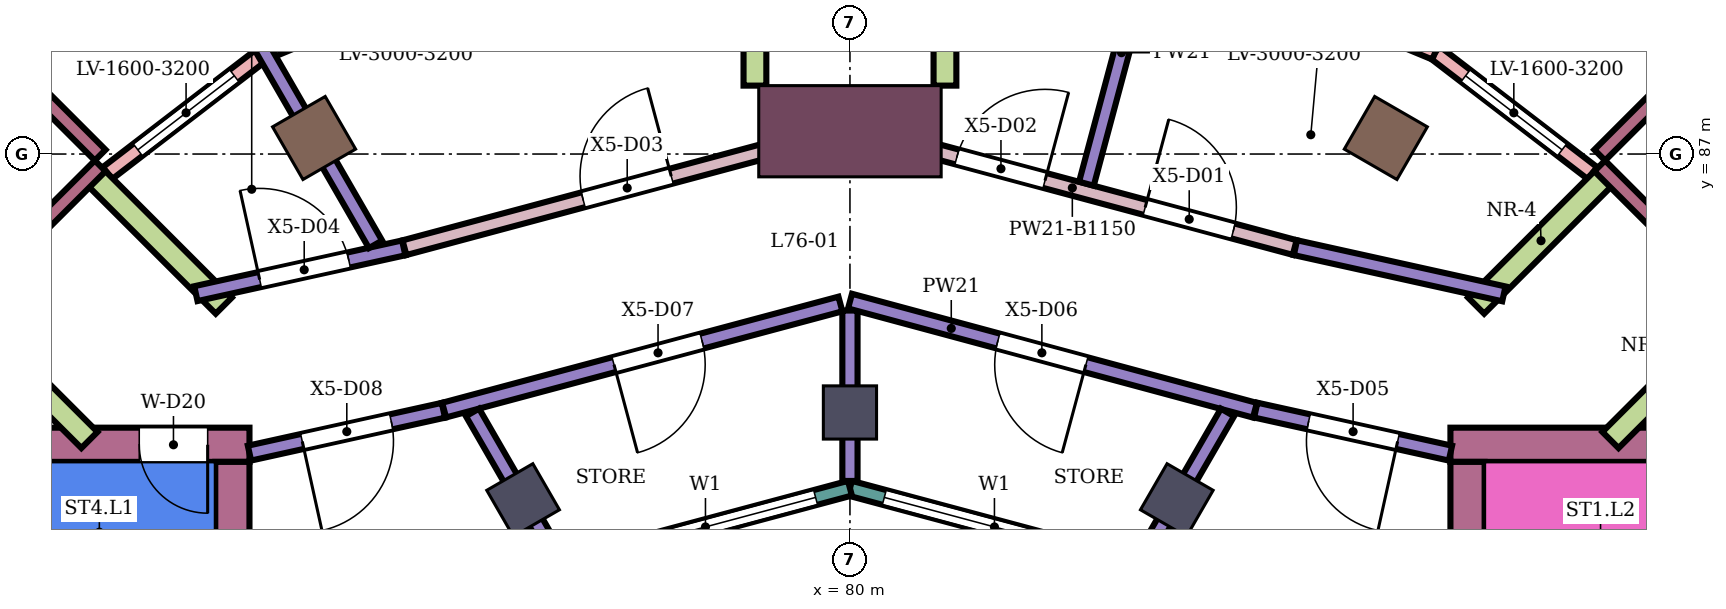
"""IFC4 building model, lengths in metres.
Left out: names, types, materials, properties, quantities, classifications, styles, units other than length and angle.
Written with IfcOpenShell. Run it as: python <this file> out.ifc"""

import sys

from ifc_helpers import new_model, si_unit, direction, frame, frame_2d, origin, origin_2d, place, context, subcontext, project, spatial, rectangle, extrude, element, fill, save


model = new_model("IFC4")
c1 = context("Model", 3, precision=1e-05, world=origin(), true_north=direction((0.0, 1.0)))
c2 = subcontext(c1, "Body", "Model", "MODEL_VIEW")
j1 = project(units=[si_unit("LENGTHUNIT", "METRE"), si_unit("PLANEANGLEUNIT", "RADIAN")], contexts=[c1])
p1 = place(None, origin())
s1 = spatial("IfcSite", under=j1, at=p1, CompositionType="ELEMENT")
p2 = place(p1, origin())
s2 = spatial("IfcBuilding", under=s1, at=p2, CompositionType="ELEMENT")
p3 = place(p2, frame((0.0, 0.0, 333.1)))
s3 = spatial("IfcBuildingStorey", under=s2, at=p3, CompositionType="ELEMENT", Elevation=333.1)
for number, where, z_axis, x_axis in (
    (1, (87.05, 87.211, 0.0), (0.0, 0.0, 1.0), (0.5, 0.866, 0.0)),
    (2, (72.95, 87.211, 0.0), (0.0, 0.0, 1.0), (-0.5, 0.866, 0.0)),
):
    element("IfcColumn", number, at=place(p3, frame(where, z_axis=z_axis, x_axis=x_axis)), inside=s3, PredefinedType="COLUMN", context=c2, shape_type="SweptSolid", body=[
        extrude(rectangle(XDim=0.8, YDim=0.8, at=origin_2d()), origin(), (0.0, 0.0, 1.0), 4.5),
    ])
for number, where, z_axis, x_axis in (
    (3, (84.3, 82.448, 0.0), (0.0, 0.0, 1.0), (0.5, 0.866, 0.0)),
    (4, (80.0, 83.6, 0.0), (0.0, 0.0, 1.0), (0.0, 1.0, 0.0)),
    (5, (75.7, 82.448, 0.0), (0.0, 0.0, 1.0), (-0.5, 0.866, 0.0)),
):
    element("IfcColumn", number, at=place(p3, frame(where, z_axis=z_axis, x_axis=x_axis)), inside=s3, PredefinedType="COLUMN", context=c2, shape_type="SweptSolid", body=[
        extrude(rectangle(XDim=0.7, YDim=0.7, at=origin_2d()), origin(), (0.0, 0.0, 1.0), 4.5),
    ])
p4 = place(p3, frame((80.0, 87.3, 0.0), z_axis=(0.0, 0.0, 1.0), x_axis=(0.0, 1.0, 0.0)))
e6 = element("IfcColumn", 6, at=p4, inside=s3, PredefinedType="COLUMN", context=c2, shape_type="SweptSolid", body=[
    extrude(rectangle(XDim=1.2, YDim=2.4, at=origin_2d()), origin(), (0.0, 0.0, 1.0), 4.5),
])
p5 = place(p3, frame((87.9, 83.175, 0.0), z_axis=(0.0, 0.0, 1.0), x_axis=(1.0, 0.0, 0.0)))
e7 = element("IfcWall", 7, at=p5, inside=s3, PredefinedType="SHEAR", context=c2, shape_type="SweptSolid", body=[
    extrude(rectangle(XDim=3.8, YDim=0.45, at=frame_2d((1.9, 0.0))), origin(), (0.0, 0.0, 1.0), 4.15),
])
p6 = place(p3, frame((88.125, 75.0, 0.0), z_axis=(0.0, 0.0, 1.0), x_axis=(0.0, 1.0, 0.0)))
e8 = element("IfcWall", 8, at=p6, inside=s3, PredefinedType="SHEAR", context=c2, shape_type="SweptSolid", body=[
    extrude(rectangle(XDim=7.95, YDim=0.45, at=frame_2d((3.975, 0.0))), origin(), (0.0, 0.0, 1.0), 4.15),
])
p7 = place(p3, frame((72.1, 83.175, 0.0), z_axis=(0.0, 0.0, 1.0), x_axis=(-1.0, 0.0, 0.0)))
e9 = element("IfcWall", 9, at=p7, inside=s3, PredefinedType="SHEAR", context=c2, shape_type="SweptSolid", body=[
    extrude(rectangle(XDim=6.3, YDim=0.45, at=frame_2d((3.15, 0.0))), origin(), (0.0, 0.0, 1.0), 4.15),
])
p8 = place(p7, frame((0.55, 0.0, 0.0)))
e10 = element("IfcOpeningElement", 10, at=p8, cuts=e9, PredefinedType="OPENING", context=c2, shape_type="SweptSolid", body=[
    extrude(rectangle(XDim=0.9, YDim=2.1, at=frame_2d((0.45, 1.05))), frame((0.0, 0.235, 0.0), z_axis=(0.0, -1.0, 0.0), x_axis=(1.0, 0.0, 0.0)), (0.0, 0.0, 1.0), 0.47),
])
p9 = place(p3, frame((71.875, 82.95, 0.0), z_axis=(0.0, 0.0, 1.0), x_axis=(0.0, -1.0, 0.0)))
e11 = element("IfcWall", 11, at=p9, inside=s3, PredefinedType="SHEAR", context=c2, shape_type="SweptSolid", body=[
    extrude(rectangle(XDim=7.95, YDim=0.45, at=frame_2d((3.975, 0.0))), origin(), (0.0, 0.0, 1.0), 4.15),
])
p10 = place(p3, frame((89.769, 86.749, 0.0), z_axis=(0.0, 0.0, 1.0), x_axis=(-0.793402901715, 0.608696833859, 0.0)))
e12 = element("IfcWall", 12, at=p10, inside=s3, PredefinedType="NOTDEFINED", context=c2, shape_type="SweptSolid", body=[
    extrude(rectangle(XDim=2.608, YDim=0.2, at=frame_2d((1.304, 0.0))), origin(), (0.0, 0.0, 1.0), 4.5),
])
p11 = place(p10, frame((0.504, 0.0, 0.5)))
e13 = element("IfcOpeningElement", 13, at=p11, cuts=e12, PredefinedType="OPENING", context=c2, shape_type="SweptSolid", body=[
    extrude(rectangle(XDim=1.6, YDim=3.2, at=frame_2d((0.8, 1.6))), frame((0.0, 0.11, 0.0), z_axis=(0.0, -1.0, 0.0), x_axis=(1.0, 0.0, 0.0)), (0.0, 0.0, 1.0), 0.22),
])
p12 = place(p3, frame((87.699, 88.336, 0.0), z_axis=(0.0, 0.0, 1.0), x_axis=(-0.923858417842, 0.38273440371, 0.0)))
e14 = element("IfcWall", 14, at=p12, inside=s3, PredefinedType="NOTDEFINED", context=c2, shape_type="SweptSolid", body=[
    extrude(rectangle(XDim=4.02, YDim=0.2, at=frame_2d((2.01, 0.0))), origin(), (0.0, 0.0, 1.0), 4.5),
])
p13 = place(p12, frame((0.51, 0.0, 0.5)))
e15 = element("IfcOpeningElement", 15, at=p13, cuts=e14, PredefinedType="OPENING", context=c2, shape_type="SweptSolid", body=[
    extrude(rectangle(XDim=3.0, YDim=3.2, at=frame_2d((1.5, 1.6))), frame((0.0, 0.11, 0.0), z_axis=(0.0, -1.0, 0.0), x_axis=(1.0, 0.0, 0.0)), (0.0, 0.0, 1.0), 0.22),
])
p14 = place(p3, frame((76.014, 89.875, 0.0), z_axis=(0.0, 0.0, 1.0), x_axis=(-0.923858417842, -0.38273440371, 0.0)))
e16 = element("IfcWall", 16, at=p14, inside=s3, PredefinedType="NOTDEFINED", context=c2, shape_type="SweptSolid", body=[
    extrude(rectangle(XDim=4.02, YDim=0.2, at=frame_2d((2.01, 0.0))), origin(), (0.0, 0.0, 1.0), 4.5),
])
p15 = place(p14, frame((0.51, 0.0, 0.5)))
e17 = element("IfcOpeningElement", 17, at=p15, cuts=e16, PredefinedType="OPENING", context=c2, shape_type="SweptSolid", body=[
    extrude(rectangle(XDim=3.0, YDim=3.2, at=frame_2d((1.5, 1.6))), frame((0.0, 0.11, 0.0), z_axis=(0.0, -1.0, 0.0), x_axis=(1.0, 0.0, 0.0)), (0.0, 0.0, 1.0), 0.22),
])
p16 = place(p3, frame((72.301, 88.336, 0.0), z_axis=(0.0, 0.0, 1.0), x_axis=(-0.793402901715, -0.608696833859, 0.0)))
e18 = element("IfcWall", 18, at=p16, inside=s3, PredefinedType="NOTDEFINED", context=c2, shape_type="SweptSolid", body=[
    extrude(rectangle(XDim=2.608, YDim=0.2, at=frame_2d((1.304, 0.0))), origin(), (0.0, 0.0, 1.0), 4.5),
])
p17 = place(p16, frame((0.504, 0.0, 0.5)))
e19 = element("IfcOpeningElement", 19, at=p17, cuts=e18, PredefinedType="OPENING", context=c2, shape_type="SweptSolid", body=[
    extrude(rectangle(XDim=1.6, YDim=3.2, at=frame_2d((0.8, 1.6))), frame((0.0, 0.11, 0.0), z_axis=(0.0, -1.0, 0.0), x_axis=(1.0, 0.0, 0.0)), (0.0, 0.0, 1.0), 0.22),
])
for number, where, z_axis, x_axis in (
    (20, (90.006, 83.238, 0.0), (0.0, 0.0, 1.0), (0.707, 0.707, 0.0)),
    (21, (88.238, 85.006, 0.0), (0.0, 0.0, 1.0), (0.707, 0.707, 0.0)),
    (22, (81.25, 87.9, 0.0), (0.0, 0.0, 1.0), (0.0, 1.0, 0.0)),
    (23, (78.75, 87.9, 0.0), (0.0, 0.0, 1.0), (0.0, 1.0, 0.0)),
    (24, (71.762, 85.006, 0.0), (0.0, 0.0, 1.0), (-0.707, 0.707, 0.0)),
    (25, (69.994, 83.238, 0.0), (0.0, 0.0, 1.0), (-0.707, 0.707, 0.0)),
):
    element("IfcWall", number, at=place(p3, frame(where, z_axis=z_axis, x_axis=x_axis)), inside=s3, PredefinedType="NOTDEFINED", context=c2, shape_type="SweptSolid", body=[
        extrude(rectangle(XDim=2.416, YDim=0.3, at=frame_2d((1.208, 0.0))), origin(), (0.0, 0.0, 1.0), 4.5),
    ])
p18 = place(p3, frame((83.802, 81.585, 0.0), z_axis=(0.0, 0.0, 1.0), x_axis=(-0.965933654434, 0.258789828301, 0.0)))
e26 = element("IfcWall", 26, at=p18, inside=s3, PredefinedType="NOTDEFINED", context=c2, shape_type="SweptSolid", body=[
    extrude(rectangle(XDim=3.936, YDim=0.2, at=frame_2d((1.968, 0.0))), origin(), (0.0, 0.0, 1.0), 4.5),
])
p19 = place(p18, frame((0.468, 0.0, 0.9)))
e27 = element("IfcOpeningElement", 27, at=p19, cuts=e26, PredefinedType="OPENING", context=c2, shape_type="SweptSolid", body=[
    extrude(rectangle(XDim=3.0, YDim=2.3, at=frame_2d((1.5, 1.15))), frame((0.0, 0.11, 0.0), z_axis=(0.0, -1.0, 0.0), x_axis=(1.0, 0.0, 0.0)), (0.0, 0.0, 1.0), 0.22),
])
p20 = place(p3, frame((80.0, 82.604, 0.0), z_axis=(0.0, 0.0, 1.0), x_axis=(-0.965933654434, -0.258789828301, 0.0)))
e28 = element("IfcWall", 28, at=p20, inside=s3, PredefinedType="NOTDEFINED", context=c2, shape_type="SweptSolid", body=[
    extrude(rectangle(XDim=3.936, YDim=0.2, at=frame_2d((1.968, 0.0))), origin(), (0.0, 0.0, 1.0), 4.5),
])
p21 = place(p20, frame((0.468, 0.0, 0.9)))
e29 = element("IfcOpeningElement", 29, at=p21, cuts=e28, PredefinedType="OPENING", context=c2, shape_type="SweptSolid", body=[
    extrude(rectangle(XDim=3.0, YDim=2.3, at=frame_2d((1.5, 1.15))), frame((0.0, 0.11, 0.0), z_axis=(0.0, -1.0, 0.0), x_axis=(1.0, 0.0, 0.0)), (0.0, 0.0, 1.0), 0.22),
])
p22 = place(p3, frame((68.156, 84.864, 0.0), z_axis=(0.0, 0.0, 1.0), x_axis=(0.707106781187, 0.707106781187, 0.0)))
e30 = element("IfcWall", 30, at=p22, inside=s3, PredefinedType="PARAPET", context=c2, shape_type="SweptSolid", body=[
    extrude(rectangle(XDim=2.8, YDim=0.2, at=frame_2d((1.4, 0.0))), origin(), (0.0, 0.0, 1.0), 1.1),
])
for number, where, z_axis, x_axis in (
    (31, (70.136, 86.985, 0.0), (0.0, 0.0, 1.0), (-0.707, 0.707, 0.0)),
    (32, (91.233, 88.354, 0.0), (0.0, 0.0, 1.0), (-0.707, -0.707, 0.0)),
):
    element("IfcWall", number, at=place(p3, frame(where, z_axis=z_axis, x_axis=x_axis)), inside=s3, PredefinedType="PARAPET", context=c2, shape_type="SweptSolid", body=[
        extrude(rectangle(XDim=1.936, YDim=0.2, at=frame_2d((0.968, 0.0))), origin(), (0.0, 0.0, 1.0), 1.1),
    ])
p23 = place(p3, frame((89.864, 86.844, 0.0), z_axis=(0.0, 0.0, 1.0), x_axis=(0.707106781187, -0.707106781187, 0.0)))
e33 = element("IfcWall", 33, at=p23, inside=s3, PredefinedType="PARAPET", context=c2, shape_type="SweptSolid", body=[
    extrude(rectangle(XDim=2.8, YDim=0.2, at=frame_2d((1.4, 0.0))), origin(), (0.0, 0.0, 1.0), 1.1),
])
p24 = place(p3, frame((71.395, 85.163, 0.0), z_axis=(0.0, 0.0, 1.0), x_axis=(0.976593576861, 0.215092969745, 0.0)))
e34 = element("IfcWall", 34, at=p24, inside=s3, PredefinedType="PARTITIONING", context=c2, shape_type="SweptSolid", body=[
    extrude(rectangle(XDim=2.8, YDim=0.2, at=frame_2d((1.4, 0.0))), origin(), (0.0, 0.0, 1.0), 4.05),
])
p25 = place(p24, frame((0.859, 0.0, 0.0)))
e35 = element("IfcOpeningElement", 35, at=p25, cuts=e34, PredefinedType="OPENING", context=c2, shape_type="SweptSolid", body=[
    extrude(rectangle(XDim=1.2, YDim=2.4, at=frame_2d((0.6, 1.2))), frame((0.0, 0.11, 0.0), z_axis=(0.0, -1.0, 0.0), x_axis=(1.0, 0.0, 0.0)), (0.0, 0.0, 1.0), 0.22),
])
p26 = place(p3, frame((72.1, 83.065, 0.0), z_axis=(0.0, 0.0, 1.0), x_axis=(0.976423939717, 0.215861738037, 0.0)))
e36 = element("IfcWall", 36, at=p26, inside=s3, PredefinedType="PARTITIONING", context=c2, shape_type="SweptSolid", body=[
    extrude(rectangle(XDim=2.613, YDim=0.2, at=frame_2d((1.306, 0.0))), origin(), (0.0, 0.0, 1.0), 4.05),
])
p27 = place(p26, frame((0.711, 0.0, 0.0)))
e37 = element("IfcOpeningElement", 37, at=p27, cuts=e36, PredefinedType="OPENING", context=c2, shape_type="SweptSolid", body=[
    extrude(rectangle(XDim=1.2, YDim=2.4, at=frame_2d((0.6, 1.2))), frame((0.0, 0.11, 0.0), z_axis=(0.0, -1.0, 0.0), x_axis=(1.0, 0.0, 0.0)), (0.0, 0.0, 1.0), 0.22),
])
p28 = place(p3, frame((72.208, 88.5, 0.0), z_axis=(0.0, 0.0, 1.0), x_axis=(0.499692942151, -0.866202611151, 0.0)))
e38 = element("IfcWall", 38, at=p28, inside=s3, PredefinedType="PARTITIONING", context=c2, shape_type="SweptSolid", body=[
    extrude(rectangle(XDim=3.104, YDim=0.2, at=frame_2d((1.552, 0.0))), origin(), (0.0, 0.0, 1.0), 4.05),
])
p29 = place(p3, frame((74.139, 85.768, 0.0), z_axis=(0.0, 0.0, 1.0), x_axis=(0.965901504328, 0.258909798842, 0.0)))
e39 = element("IfcWall", 39, at=p29, inside=s3, PredefinedType="PARTITIONING", context=c2, shape_type="SweptSolid", body=[
    extrude(rectangle(XDim=6.018, YDim=0.2, at=frame_2d((3.009, 0.0))), origin(), (0.0, 0.0, 1.0), 3.35),
])
p30 = place(p29, frame((2.434, 0.0, 0.0)))
e40 = element("IfcOpeningElement", 40, at=p30, cuts=e39, PredefinedType="OPENING", context=c2, shape_type="SweptSolid", body=[
    extrude(rectangle(XDim=1.2, YDim=2.4, at=frame_2d((0.6, 1.2))), frame((0.0, 0.11, 0.0), z_axis=(0.0, -1.0, 0.0), x_axis=(1.0, 0.0, 0.0)), (0.0, 0.0, 1.0), 0.22),
])
p31 = place(p3, frame((74.661, 83.631, 0.0), z_axis=(0.0, 0.0, 1.0), x_axis=(0.965971667126, 0.258647904127, 0.0)))
e41 = element("IfcWall", 41, at=p31, inside=s3, PredefinedType="PARTITIONING", context=c2, shape_type="SweptSolid", body=[
    extrude(rectangle(XDim=5.397, YDim=0.2, at=frame_2d((2.699, 0.0))), origin(), (0.0, 0.0, 1.0), 4.05),
])
p32 = place(p31, frame((2.313, 0.0, 0.0)))
e42 = element("IfcOpeningElement", 42, at=p32, cuts=e41, PredefinedType="OPENING", context=c2, shape_type="SweptSolid", body=[
    extrude(rectangle(XDim=1.2, YDim=2.4, at=frame_2d((0.6, 1.2))), frame((0.0, 0.11, 0.0), z_axis=(0.0, -1.0, 0.0), x_axis=(1.0, 0.0, 0.0)), (0.0, 0.0, 1.0), 0.22),
])
p33 = place(p3, frame((75.034, 83.601, 0.0), z_axis=(0.0, 0.0, 1.0), x_axis=(0.499643577634, -0.866231086563, 0.0)))
e43 = element("IfcWall", 43, at=p33, inside=s3, PredefinedType="PARTITIONING", context=c2, shape_type="SweptSolid", body=[
    extrude(rectangle(XDim=2.233, YDim=0.2, at=frame_2d((1.117, 0.0))), origin(), (0.0, 0.0, 1.0), 4.05),
])
p34 = place(p3, frame((80.0, 82.699, 0.0), z_axis=(0.0, 0.0, 1.0), x_axis=(0.0, 1.0, 0.0)))
e44 = element("IfcWall", 44, at=p34, inside=s3, PredefinedType="PARTITIONING", context=c2, shape_type="SweptSolid", body=[
    extrude(rectangle(XDim=2.242, YDim=0.2, at=frame_2d((1.121, 0.0))), origin(), (0.0, 0.0, 1.0), 4.05),
])
p35 = place(p3, frame((80.0, 87.339, 0.0), z_axis=(0.0, 0.0, 1.0), x_axis=(0.96586472806, -0.259046959234, 0.0)))
e45 = element("IfcWall", 45, at=p35, inside=s3, PredefinedType="PARTITIONING", context=c2, shape_type="SweptSolid", body=[
    extrude(rectangle(XDim=6.058, YDim=0.2, at=frame_2d((3.029, 0.0))), origin(), (0.0, 0.0, 1.0), 3.35),
])
p36 = place(p35, frame((4.021, 0.0, 0.0)))
e46 = element("IfcOpeningElement", 46, at=p36, cuts=e45, PredefinedType="OPENING", context=c2, shape_type="SweptSolid", body=[
    extrude(rectangle(XDim=1.2, YDim=2.4, at=frame_2d((0.6, 1.2))), frame((0.0, 0.11, 0.0), z_axis=(0.0, -1.0, 0.0), x_axis=(1.0, 0.0, 0.0)), (0.0, 0.0, 1.0), 0.22),
])
p37 = place(p35, frame((1.457, 0.0, 0.0)))
e47 = element("IfcOpeningElement", 47, at=p37, cuts=e45, PredefinedType="OPENING", context=c2, shape_type="SweptSolid", body=[
    extrude(rectangle(XDim=1.2, YDim=2.4, at=frame_2d((0.6, 1.2))), frame((0.0, 0.11, 0.0), z_axis=(0.0, -1.0, 0.0), x_axis=(1.0, 0.0, 0.0)), (0.0, 0.0, 1.0), 0.22),
])
p38 = place(p3, frame((80.001, 85.065, 0.0), z_axis=(0.0, 0.0, 1.0), x_axis=(0.965552921813, -0.260206754675, 0.0)))
e48 = element("IfcWall", 48, at=p38, inside=s3, PredefinedType="PARTITIONING", context=c2, shape_type="SweptSolid", body=[
    extrude(rectangle(XDim=5.517, YDim=0.2, at=frame_2d((2.758, 0.0))), origin(), (0.0, 0.0, 1.0), 4.05),
])
p39 = place(p38, frame((2.014, 0.0, 0.0)))
e49 = element("IfcOpeningElement", 49, at=p39, cuts=e48, PredefinedType="OPENING", context=c2, shape_type="SweptSolid", body=[
    extrude(rectangle(XDim=1.2, YDim=2.4, at=frame_2d((0.6, 1.2))), frame((0.0, 0.11, 0.0), z_axis=(0.0, -1.0, 0.0), x_axis=(1.0, 0.0, 0.0)), (0.0, 0.0, 1.0), 0.22),
])
p40 = place(p3, frame((83.111, 86.61, 0.0), z_axis=(0.0, 0.0, 1.0), x_axis=(0.258761164689, 0.965941333441, 0.0)))
e50 = element("IfcWall", 50, at=p40, inside=s3, PredefinedType="PARTITIONING", context=c2, shape_type="SweptSolid", body=[
    extrude(rectangle(XDim=3.568, YDim=0.2, at=frame_2d((1.784, 0.0))), origin(), (0.0, 0.0, 1.0), 4.05),
])
p41 = place(p3, frame((83.85, 81.667, 0.0), z_axis=(0.0, 0.0, 1.0), x_axis=(0.500066293759, 0.865987125681, 0.0)))
e51 = element("IfcWall", 51, at=p41, inside=s3, PredefinedType="PARTITIONING", context=c2, shape_type="SweptSolid", body=[
    extrude(rectangle(XDim=2.233, YDim=0.2, at=frame_2d((1.117, 0.0))), origin(), (0.0, 0.0, 1.0), 4.05),
])
p42 = place(p3, frame((85.339, 83.631, 0.0), z_axis=(0.0, 0.0, 1.0), x_axis=(0.976420858197, -0.215875676438, 0.0)))
e52 = element("IfcWall", 52, at=p42, inside=s3, PredefinedType="PARTITIONING", context=c2, shape_type="SweptSolid", body=[
    extrude(rectangle(XDim=2.623, YDim=0.2, at=frame_2d((1.311, 0.0))), origin(), (0.0, 0.0, 1.0), 4.05),
])
p43 = place(p42, frame((0.711, 0.0, 0.0)))
e53 = element("IfcOpeningElement", 53, at=p43, cuts=e52, PredefinedType="OPENING", context=c2, shape_type="SweptSolid", body=[
    extrude(rectangle(XDim=1.2, YDim=2.4, at=frame_2d((0.6, 1.2))), frame((0.0, 0.11, 0.0), z_axis=(0.0, -1.0, 0.0), x_axis=(1.0, 0.0, 0.0)), (0.0, 0.0, 1.0), 0.22),
])
p44 = place(p3, frame((85.861, 85.768, 0.0), z_axis=(0.0, 0.0, 1.0), x_axis=(0.976315738101, -0.216350594029, 0.0)))
e54 = element("IfcWall", 54, at=p44, inside=s3, PredefinedType="PARTITIONING", context=c2, shape_type="SweptSolid", body=[
    extrude(rectangle(XDim=2.809, YDim=0.2, at=frame_2d((1.404, 0.0))), origin(), (0.0, 0.0, 1.0), 4.05),
])
p45 = place(p11, origin())
e55 = element("IfcWindow", 55, at=p45, inside=s3, PartitioningType="SINGLE_PANEL", PredefinedType="USERDEFINED", context=c2, shape_type="SweptSolid", body=[
    extrude(rectangle(XDim=1.6, YDim=3.2, at=frame_2d((0.8, 1.6))), frame((0.0, 0.03, 0.0), z_axis=(0.0, -1.0, 0.0), x_axis=(1.0, 0.0, 0.0)), (0.0, 0.0, 1.0), 0.06),
])
fill(e13, e55)
p46 = place(p17, origin())
e56 = element("IfcWindow", 56, at=p46, inside=s3, PartitioningType="SINGLE_PANEL", PredefinedType="USERDEFINED", context=c2, shape_type="SweptSolid", body=[
    extrude(rectangle(XDim=1.6, YDim=3.2, at=frame_2d((0.8, 1.6))), frame((0.0, 0.03, 0.0), z_axis=(0.0, -1.0, 0.0), x_axis=(1.0, 0.0, 0.0)), (0.0, 0.0, 1.0), 0.06),
])
fill(e19, e56)
p47 = place(p19, origin())
e57 = element("IfcWindow", 57, at=p47, inside=s3, PartitioningType="SINGLE_PANEL", PredefinedType="WINDOW", context=c2, shape_type="SweptSolid", body=[
    extrude(rectangle(XDim=3.0, YDim=2.3, at=frame_2d((1.5, 1.15))), frame((0.0, 0.03, 0.0), z_axis=(0.0, -1.0, 0.0), x_axis=(1.0, 0.0, 0.0)), (0.0, 0.0, 1.0), 0.06),
])
fill(e27, e57)
p48 = place(p21, origin())
e58 = element("IfcWindow", 58, at=p48, inside=s3, PartitioningType="SINGLE_PANEL", PredefinedType="WINDOW", context=c2, shape_type="SweptSolid", body=[
    extrude(rectangle(XDim=3.0, YDim=2.3, at=frame_2d((1.5, 1.15))), frame((0.0, 0.03, 0.0), z_axis=(0.0, -1.0, 0.0), x_axis=(1.0, 0.0, 0.0)), (0.0, 0.0, 1.0), 0.06),
])
fill(e29, e58)
p49 = place(p36, origin())
e59 = element("IfcDoor", 59, at=p49, inside=s3, OperationType="SINGLE_SWING_LEFT", PredefinedType="DOOR", context=c2, shape_type="SweptSolid", body=[
    extrude(rectangle(XDim=1.2, YDim=2.4, at=frame_2d((0.6, 1.2))), frame((0.0, 0.025, 0.0), z_axis=(0.0, -1.0, 0.0), x_axis=(1.0, 0.0, 0.0)), (0.0, 0.0, 1.0), 0.05),
])
fill(e46, e59)
p50 = place(p37, origin())
e60 = element("IfcDoor", 60, at=p50, inside=s3, OperationType="SINGLE_SWING_RIGHT", PredefinedType="DOOR", context=c2, shape_type="SweptSolid", body=[
    extrude(rectangle(XDim=1.2, YDim=2.4, at=frame_2d((0.6, 1.2))), frame((0.0, 0.025, 0.0), z_axis=(0.0, -1.0, 0.0), x_axis=(1.0, 0.0, 0.0)), (0.0, 0.0, 1.0), 0.05),
])
fill(e47, e60)
p51 = place(p30, origin())
e61 = element("IfcDoor", 61, at=p51, inside=s3, OperationType="SINGLE_SWING_RIGHT", PredefinedType="DOOR", context=c2, shape_type="SweptSolid", body=[
    extrude(rectangle(XDim=1.2, YDim=2.4, at=frame_2d((0.6, 1.2))), frame((0.0, 0.025, 0.0), z_axis=(0.0, -1.0, 0.0), x_axis=(1.0, 0.0, 0.0)), (0.0, 0.0, 1.0), 0.05),
])
fill(e40, e61)
p52 = place(p25, origin())
e62 = element("IfcDoor", 62, at=p52, inside=s3, OperationType="SINGLE_SWING_LEFT", PredefinedType="DOOR", context=c2, shape_type="SweptSolid", body=[
    extrude(rectangle(XDim=1.2, YDim=2.4, at=frame_2d((0.6, 1.2))), frame((0.0, 0.025, 0.0), z_axis=(0.0, -1.0, 0.0), x_axis=(1.0, 0.0, 0.0)), (0.0, 0.0, 1.0), 0.05),
])
fill(e35, e62)
p53 = place(p43, frame((1.2, 0.0, 0.0), z_axis=(0.0, 0.0, 1.0), x_axis=(-1.0, 0.0, 0.0)))
e63 = element("IfcDoor", 63, at=p53, inside=s3, OperationType="SINGLE_SWING_LEFT", PredefinedType="DOOR", context=c2, shape_type="SweptSolid", body=[
    extrude(rectangle(XDim=1.2, YDim=2.4, at=frame_2d((0.6, 1.2))), frame((0.0, 0.025, 0.0), z_axis=(0.0, -1.0, 0.0), x_axis=(1.0, 0.0, 0.0)), (0.0, 0.0, 1.0), 0.05),
])
fill(e53, e63)
p54 = place(p39, frame((1.2, 0.0, 0.0), z_axis=(0.0, 0.0, 1.0), x_axis=(-1.0, 0.0, 0.0)))
e64 = element("IfcDoor", 64, at=p54, inside=s3, OperationType="SINGLE_SWING_LEFT", PredefinedType="DOOR", context=c2, shape_type="SweptSolid", body=[
    extrude(rectangle(XDim=1.2, YDim=2.4, at=frame_2d((0.6, 1.2))), frame((0.0, 0.025, 0.0), z_axis=(0.0, -1.0, 0.0), x_axis=(1.0, 0.0, 0.0)), (0.0, 0.0, 1.0), 0.05),
])
fill(e49, e64)
p55 = place(p32, frame((1.2, 0.0, 0.0), z_axis=(0.0, 0.0, 1.0), x_axis=(-1.0, 0.0, 0.0)))
e65 = element("IfcDoor", 65, at=p55, inside=s3, OperationType="SINGLE_SWING_RIGHT", PredefinedType="DOOR", context=c2, shape_type="SweptSolid", body=[
    extrude(rectangle(XDim=1.2, YDim=2.4, at=frame_2d((0.6, 1.2))), frame((0.0, 0.025, 0.0), z_axis=(0.0, -1.0, 0.0), x_axis=(1.0, 0.0, 0.0)), (0.0, 0.0, 1.0), 0.05),
])
fill(e42, e65)
p56 = place(p27, frame((1.2, 0.0, 0.0), z_axis=(0.0, 0.0, 1.0), x_axis=(-1.0, 0.0, 0.0)))
e66 = element("IfcDoor", 66, at=p56, inside=s3, OperationType="SINGLE_SWING_RIGHT", PredefinedType="DOOR", context=c2, shape_type="SweptSolid", body=[
    extrude(rectangle(XDim=1.2, YDim=2.4, at=frame_2d((0.6, 1.2))), frame((0.0, 0.025, 0.0), z_axis=(0.0, -1.0, 0.0), x_axis=(1.0, 0.0, 0.0)), (0.0, 0.0, 1.0), 0.05),
])
fill(e37, e66)
p57 = place(p8, origin())
e67 = element("IfcDoor", 67, at=p57, inside=s3, OperationType="SINGLE_SWING_LEFT", PredefinedType="DOOR", context=c2, shape_type="SweptSolid", body=[
    extrude(rectangle(XDim=0.9, YDim=2.1, at=frame_2d((0.45, 1.05))), frame((0.0, 0.025, 0.0), z_axis=(0.0, -1.0, 0.0), x_axis=(1.0, 0.0, 0.0)), (0.0, 0.0, 1.0), 0.05),
])
fill(e10, e67)
save(model, sys.argv[1])
